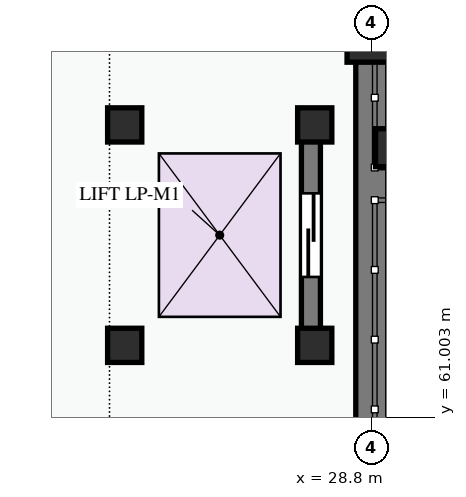
"""IFC4 building model, lengths in metres.
Left out: names, types, materials, properties, quantities, classifications, styles, units other than length and angle.
Written with IfcOpenShell. Run it as: python <this file> out.ifc"""

import sys

from ifc_helpers import new_model, si_unit, direction, frame, frame_2d, origin, origin_2d, place, context, subcontext, project, spatial, rectangle, circle, extrude, element, fill, save


model = new_model("IFC4")
c1 = context("Model", 3, precision=1e-05, world=origin(), true_north=direction((0.0, 1.0)))
c2 = subcontext(c1, "Body", "Model", "MODEL_VIEW")
j1 = project(units=[si_unit("LENGTHUNIT", "METRE"), si_unit("PLANEANGLEUNIT", "RADIAN")], contexts=[c1])
p1 = place(None, origin())
s1 = spatial("IfcSite", under=j1, at=p1, CompositionType="ELEMENT")
p2 = place(p1, origin())
s2 = spatial("IfcBuilding", under=s1, at=p2, CompositionType="ELEMENT")
p3 = place(p2, frame((0.0, 0.0, -4.2)))
s3 = spatial("IfcBuildingStorey", under=s2, at=p3, CompositionType="ELEMENT", Elevation=-4.2)
for number, where, z_axis, x_axis in (
    (1, (25.55, 61.95, -0.45), (0.0, 0.0, 1.0), (1.0, 0.0, 0.0)),
    (2, (25.55, 64.85, -0.45), (0.0, 0.0, 1.0), (1.0, 0.0, 0.0)),
    (3, (28.05, 61.95, -0.45), (0.0, 0.0, 1.0), (1.0, 0.0, 0.0)),
    (4, (28.05, 64.85, -0.45), (0.0, 0.0, 1.0), (1.0, 0.0, 0.0)),
):
    element("IfcColumn", number, at=place(p3, frame(where, z_axis=z_axis, x_axis=x_axis)), inside=s3, PredefinedType="COLUMN", context=c2, shape_type="SweptSolid", body=[
        extrude(rectangle(XDim=0.45, YDim=0.45, at=origin_2d()), origin(), (0.0, 0.0, 1.0), 4.65),
    ])
p4 = place(p3, frame((28.8, 66.0, -0.45), z_axis=(0.0, 0.0, 1.0), x_axis=(1.0, 0.0, 0.0)))
e5 = element("IfcColumn", 5, at=p4, inside=s3, PredefinedType="COLUMN", context=c2, shape_type="SweptSolid", body=[
    extrude(rectangle(XDim=0.65, YDim=0.65, at=origin_2d()), origin(), (0.0, 0.0, 1.0), 4.65),
])
p5 = place(p3, frame((29.1, 64.55, -0.45), z_axis=(0.0, 0.0, 1.0), x_axis=(1.0, 0.0, 0.0)))
e6 = element("IfcColumn", 6, at=p5, inside=s3, PredefinedType="COLUMN", context=c2, shape_type="SweptSolid", body=[
    extrude(circle(Radius=0.25, at=origin_2d()), origin(), (0.0, 0.0, 1.0), 3.05),
])
p6 = place(p3, frame((28.8, 57.6, 0.0), z_axis=(0.0, 0.0, 1.0), x_axis=(0.0, 1.0, 0.0)))
e7 = element("IfcWall", 7, at=p6, inside=s3, PredefinedType="SHEAR", context=c2, shape_type="SweptSolid", body=[
    extrude(rectangle(XDim=14.4, YDim=0.42, at=frame_2d((7.2, 0.0))), origin(), (0.0, 0.0, 1.0), 3.9),
])
p7 = place(p3, frame((28.0, 61.9, 0.0), z_axis=(0.0, 0.0, 1.0), x_axis=(0.0, 1.0, 0.0)))
e8 = element("IfcWall", 8, at=p7, inside=s3, PredefinedType="SHEAR", context=c2, shape_type="SweptSolid", body=[
    extrude(rectangle(XDim=3.0, YDim=0.25, at=frame_2d((1.5, 0.0))), origin(), (0.0, 0.0, 1.0), 3.9),
])
p8 = place(p7, frame((0.95, 0.0, 0.0)))
e9 = element("IfcOpeningElement", 9, at=p8, cuts=e8, PredefinedType="OPENING", context=c2, shape_type="SweptSolid", body=[
    extrude(rectangle(XDim=1.1, YDim=2.15, at=frame_2d((0.55, 1.075))), frame((0.0, 0.135, 0.0), z_axis=(0.0, -1.0, 0.0), x_axis=(1.0, 0.0, 0.0)), (0.0, 0.0, 1.0), 0.27),
])
p9 = place(p8, origin())
e10 = element("IfcDoor", 10, at=p9, inside=s3, OperationType="SLIDING_TO_LEFT", PredefinedType="DOOR", context=c2, shape_type="SweptSolid", body=[
    extrude(rectangle(XDim=1.1, YDim=2.15, at=frame_2d((0.55, 1.075))), frame((0.0, 0.025, 0.0), z_axis=(0.0, -1.0, 0.0), x_axis=(1.0, 0.0, 0.0)), (0.0, 0.0, 1.0), 0.05),
])
fill(e9, e10)
save(model, sys.argv[1])
